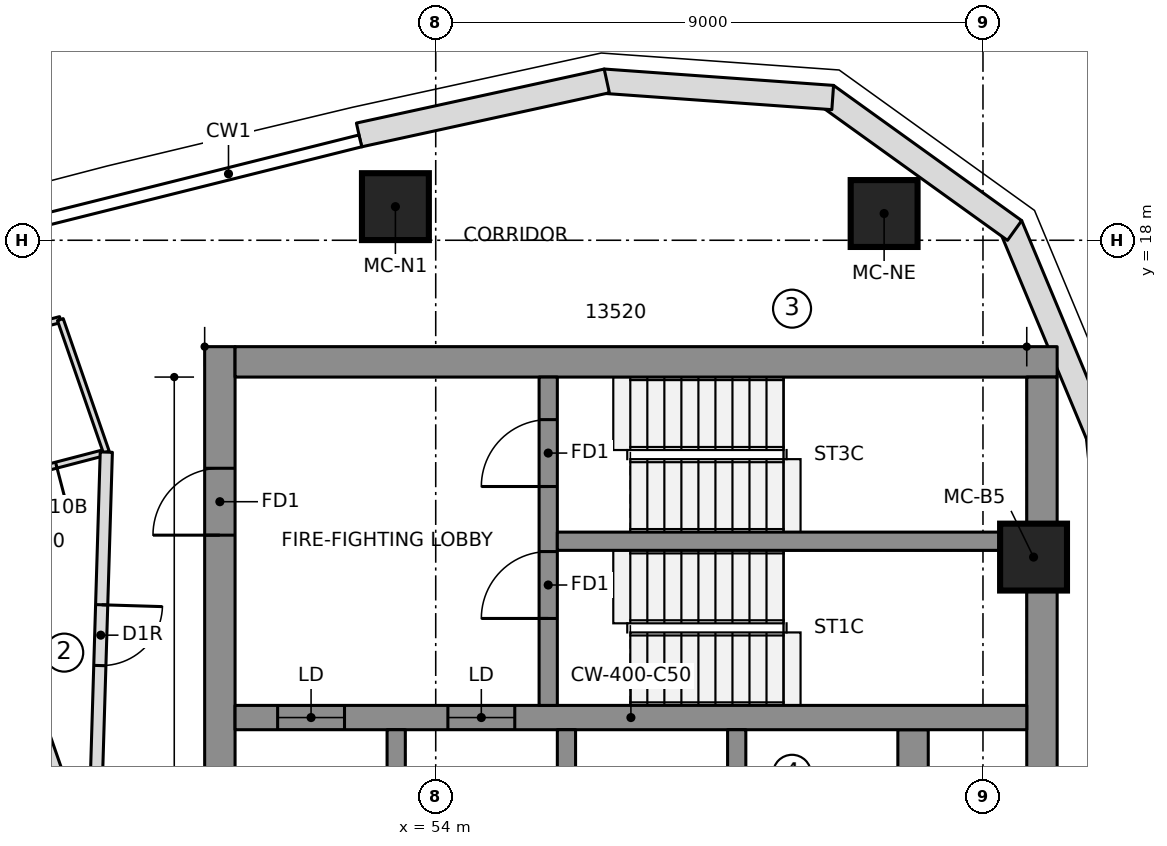
"""IFC4 building model, lengths in metres.
Left out: names, types, materials, properties, quantities, classifications, styles, units other than length and angle.
Written with IfcOpenShell. Run it as: python <this file> out.ifc"""

import sys

from ifc_helpers import new_model, si_unit, direction, frame, frame_2d, origin, origin_2d, place, context, subcontext, project, spatial, polyline, rectangle, outline, extrude, element, fill, save


model = new_model("IFC4")
c1 = context("Model", 3, precision=1e-05, world=origin(), true_north=direction((0.0, 1.0)))
c2 = subcontext(c1, "Body", "Model", "MODEL_VIEW")
j1 = project(units=[si_unit("LENGTHUNIT", "METRE"), si_unit("PLANEANGLEUNIT", "RADIAN")], contexts=[c1])
p1 = place(None, origin())
s1 = spatial("IfcSite", under=j1, at=p1, CompositionType="ELEMENT")
p2 = place(p1, origin())
s2 = spatial("IfcBuilding", under=s1, at=p2, CompositionType="ELEMENT")
p3 = place(p2, frame((0.0, 0.0, 285.65)))
s3 = spatial("IfcBuildingStorey", under=s2, at=p3, CompositionType="ELEMENT", Elevation=285.65)
p4 = place(p3, frame((50.45, 6.65, 0.0), z_axis=(0.0, 0.0, 1.0), x_axis=(0.0, 1.0, 0.0)))
e1 = element("IfcWall", 1, at=p4, inside=s3, PredefinedType="SHEAR", context=c2, shape_type="SweptSolid", body=[
    extrude(rectangle(XDim=9.6, YDim=0.5, at=frame_2d((4.8, 0.0))), origin(), (0.0, 0.0, 1.0), 3.55),
])
p5 = place(p4, frame((6.5, 0.0, 0.0)))
e2 = element("IfcOpeningElement", 2, at=p5, cuts=e1, PredefinedType="OPENING", context=c2, shape_type="SweptSolid", body=[
    extrude(rectangle(XDim=1.1, YDim=2.1, at=frame_2d((0.55, 1.05))), frame((0.0, 0.26, 0.0), z_axis=(0.0, -1.0, 0.0), x_axis=(1.0, 0.0, 0.0)), (0.0, 0.0, 1.0), 0.52),
])
p6 = place(p3, frame((50.7, 16.0, 0.0), z_axis=(0.0, 0.0, 1.0), x_axis=(1.0, 0.0, 0.0)))
e3 = element("IfcWall", 3, at=p6, inside=s3, PredefinedType="SHEAR", context=c2, shape_type="SweptSolid", body=[
    extrude(rectangle(XDim=13.52, YDim=0.5, at=frame_2d((6.76, 0.0))), origin(), (0.0, 0.0, 1.0), 3.55),
])
p7 = place(p3, frame((63.97, 6.903, 0.0), z_axis=(0.0, 0.0, 1.0), x_axis=(0.0, 1.0, 0.0)))
e4 = element("IfcWall", 4, at=p7, inside=s3, PredefinedType="SHEAR", context=c2, shape_type="SweptSolid", body=[
    extrude(rectangle(XDim=8.847, YDim=0.5, at=frame_2d((4.423, 0.0))), origin(), (0.0, 0.0, 1.0), 3.55),
])
p8 = place(p3, frame((61.85, -9.95, 0.0), z_axis=(0.0, 0.0, 1.0), x_axis=(0.0, 1.0, 0.0)))
e5 = element("IfcWall", 5, at=p8, inside=s3, PredefinedType="SHEAR", context=c2, shape_type="SweptSolid", body=[
    extrude(rectangle(XDim=19.9, YDim=0.5, at=frame_2d((9.95, 0.0))), origin(), (0.0, 0.0, 1.0), 3.55),
])
p9 = place(p3, frame((50.7, 10.15, 0.0), z_axis=(0.0, 0.0, 1.0), x_axis=(1.0, 0.0, 0.0)))
e6 = element("IfcWall", 6, at=p9, inside=s3, PredefinedType="SHEAR", context=c2, shape_type="SweptSolid", body=[
    extrude(rectangle(XDim=13.02, YDim=0.4, at=frame_2d((6.51, 0.0))), origin(), (0.0, 0.0, 1.0), 3.55),
])
p10 = place(p9, frame((0.7, 0.0, 0.0)))
e7 = element("IfcOpeningElement", 7, at=p10, cuts=e6, PredefinedType="OPENING", context=c2, shape_type="SweptSolid", body=[
    extrude(rectangle(XDim=1.1, YDim=2.1, at=frame_2d((0.55, 1.05))), frame((0.0, 0.21, 0.0), z_axis=(0.0, -1.0, 0.0), x_axis=(1.0, 0.0, 0.0)), (0.0, 0.0, 1.0), 0.42),
])
p11 = place(p9, frame((3.5, 0.0, 0.0)))
e8 = element("IfcOpeningElement", 8, at=p11, cuts=e6, PredefinedType="OPENING", context=c2, shape_type="SweptSolid", body=[
    extrude(rectangle(XDim=1.1, YDim=2.1, at=frame_2d((0.55, 1.05))), frame((0.0, 0.21, 0.0), z_axis=(0.0, -1.0, 0.0), x_axis=(1.0, 0.0, 0.0)), (0.0, 0.0, 1.0), 0.42),
])
for number, where, z_axis, x_axis in (
    (9, (53.35, 6.95, 0.0), (0.0, 0.0, 1.0), (0.0, 1.0, 0.0)),
    (10, (56.15, 6.95, 0.0), (0.0, 0.0, 1.0), (0.0, 1.0, 0.0)),
    (11, (58.95, 6.95, 0.0), (0.0, 0.0, 1.0), (0.0, 1.0, 0.0)),
):
    element("IfcWall", number, at=place(p3, frame(where, z_axis=z_axis, x_axis=x_axis)), inside=s3, PredefinedType="SHEAR", context=c2, shape_type="SweptSolid", body=[
        extrude(rectangle(XDim=3.0, YDim=0.3, at=frame_2d((1.5, 0.0))), origin(), (0.0, 0.0, 1.0), 3.55),
    ])
p12 = place(p3, frame((55.85, 10.35, 0.0), z_axis=(0.0, 0.0, 1.0), x_axis=(0.0, 1.0, 0.0)))
e12 = element("IfcWall", 12, at=p12, inside=s3, PredefinedType="SHEAR", context=c2, shape_type="SweptSolid", body=[
    extrude(rectangle(XDim=5.4, YDim=0.3, at=frame_2d((2.7, 0.0))), origin(), (0.0, 0.0, 1.0), 3.55),
])
p13 = place(p12, frame((1.43, 0.0, 0.0)))
e13 = element("IfcOpeningElement", 13, at=p13, cuts=e12, PredefinedType="OPENING", context=c2, shape_type="SweptSolid", body=[
    extrude(rectangle(XDim=1.1, YDim=2.1, at=frame_2d((0.55, 1.05))), frame((0.0, 0.16, 0.0), z_axis=(0.0, -1.0, 0.0), x_axis=(1.0, 0.0, 0.0)), (0.0, 0.0, 1.0), 0.32),
])
p14 = place(p12, frame((3.6, 0.0, 0.0)))
e14 = element("IfcOpeningElement", 14, at=p14, cuts=e12, PredefinedType="OPENING", context=c2, shape_type="SweptSolid", body=[
    extrude(rectangle(XDim=1.1, YDim=2.1, at=frame_2d((0.55, 1.05))), frame((0.0, 0.16, 0.0), z_axis=(0.0, -1.0, 0.0), x_axis=(1.0, 0.0, 0.0)), (0.0, 0.0, 1.0), 0.32),
])
p15 = place(p3, frame((56.0, 13.05, 0.0), z_axis=(0.0, 0.0, 1.0), x_axis=(1.0, 0.0, 0.0)))
e15 = element("IfcWall", 15, at=p15, inside=s3, PredefinedType="SHEAR", context=c2, shape_type="SweptSolid", body=[
    extrude(rectangle(XDim=7.72, YDim=0.3, at=frame_2d((3.86, 0.0))), origin(), (0.0, 0.0, 1.0), 3.55),
])
for number, where, z_axis, x_axis in (
    (16, (63.832, 12.789, 0.0), (0.0, 0.0, 1.0), (1.0, 0.0, 0.0)),
    (17, (61.374, 18.44, 0.0), (0.0, 0.0, 1.0), (1.0, 0.0, 0.0)),
    (18, (53.337, 18.553, 0.0), (0.0, 0.0, 1.0), (1.0, 0.0, 0.0)),
):
    element("IfcColumn", number, at=place(p3, frame(where, z_axis=z_axis, x_axis=x_axis)), inside=s3, PredefinedType="COLUMN", context=c2, shape_type="SweptSolid", body=[
        extrude(rectangle(XDim=1.1, YDim=1.1, at=origin_2d()), origin(), (0.0, 0.0, 1.0), 3.55),
    ])
p16 = place(p3, frame((65.331, 10.571, 0.0), z_axis=(0.0, 0.0, 1.0), x_axis=(-0.102249826987, 0.994758751096, 0.0)))
e19 = element("IfcWall", 19, at=p16, inside=s3, PredefinedType="NOTDEFINED", context=c2, shape_type="SweptSolid", body=[
    extrude(outline(polyline([(-0.003, -0.2), (4.263, -0.2), (4.204, 0.2), (0.003, 0.2), (-0.003, -0.2)])), origin(), (0.0, 0.0, 1.0), 3.25),
])
p17 = place(p3, frame((64.898, 14.782, 0.0), z_axis=(0.0, 0.0, 1.0), x_axis=(-0.385285857918, 0.922797273343, 0.0)))
e20 = element("IfcWall", 20, at=p17, inside=s3, PredefinedType="NOTDEFINED", context=c2, shape_type="SweptSolid", body=[
    extrude(outline(polyline([(-0.03, -0.2), (3.753, -0.2), (3.64, 0.2), (0.03, 0.2), (-0.03, -0.2)])), origin(), (0.0, 0.0, 1.0), 3.25),
])
p18 = place(p3, frame((63.474, 18.194, 0.0), z_axis=(0.0, 0.0, 1.0), x_axis=(-0.811962548682, 0.583709533533, 0.0)))
e21 = element("IfcWall", 21, at=p18, inside=s3, PredefinedType="NOTDEFINED", context=c2, shape_type="SweptSolid", body=[
    extrude(outline(polyline([(-0.057, -0.2), (3.753, -0.2), (3.64, 0.2), (0.057, 0.2), (-0.057, -0.2)])), origin(), (0.0, 0.0, 1.0), 3.25),
])
p19 = place(p3, frame((60.472, 20.352, 0.0), z_axis=(0.0, 0.0, 1.0), x_axis=(-0.99746272096, 0.071190731806, 0.0)))
e22 = element("IfcWall", 22, at=p19, inside=s3, PredefinedType="NOTDEFINED", context=c2, shape_type="SweptSolid", body=[
    extrude(outline(polyline([(-0.057, -0.2), (3.726, -0.2), (3.668, 0.2), (0.057, 0.2), (-0.057, -0.2)])), origin(), (0.0, 0.0, 1.0), 3.25),
])
p20 = place(p3, frame((56.785, 20.615, 0.0), z_axis=(0.0, 0.0, 1.0), x_axis=(-0.977020225348, -0.213146614471, 0.0)))
e23 = element("IfcWall", 23, at=p20, inside=s3, PredefinedType="NOTDEFINED", context=c2, shape_type="SweptSolid", body=[
    extrude(outline(polyline([(-0.029, -0.2), (4.142, -0.2), (4.142, 0.2), (0.029, 0.2), (-0.029, -0.2)])), origin(), (0.0, 0.0, 1.0), 3.25),
])
p21 = place(p3, frame((48.023, 8.5, 0.0), z_axis=(0.0, 0.0, 1.0), x_axis=(-0.327705598625, 0.944779890043, 0.0)))
e24 = element("IfcWall", 24, at=p21, inside=s3, PredefinedType="PARTITIONING", context=c2, shape_type="SweptSolid", body=[
    extrude(rectangle(XDim=9.61, YDim=0.2, at=frame_2d((4.805, 0.0))), origin(), (0.0, 0.0, 1.0), 3.25),
])
p22 = place(p3, frame((48.583, 14.516, 0.0), z_axis=(0.0, 0.0, 1.0), x_axis=(-0.967665843663, -0.252235633897, 0.0)))
e25 = element("IfcWall", 25, at=p22, inside=s3, PredefinedType="PARTITIONING", context=c2, shape_type="SweptSolid", body=[
    extrude(rectangle(XDim=2.508, YDim=0.1, at=frame_2d((1.254, 0.0))), origin(), (0.0, 0.0, 1.0), 3.25),
])
p23 = place(p22, frame((0.85, 0.0, 0.0)))
e26 = element("IfcOpeningElement", 26, at=p23, cuts=e25, PredefinedType="OPENING", context=c2, shape_type="SweptSolid", body=[
    extrude(rectangle(XDim=0.8, YDim=2.1, at=frame_2d((0.4, 1.05))), frame((0.0, 0.06, 0.0), z_axis=(0.0, -1.0, 0.0), x_axis=(1.0, 0.0, 0.0)), (0.0, 0.0, 1.0), 0.12),
])
p24 = place(p3, frame((45.955, 16.208, 0.0), z_axis=(0.0, 0.0, 1.0), x_axis=(0.967650770907, 0.25229345129, 0.0)))
e27 = element("IfcWall", 27, at=p24, inside=s3, PredefinedType="PARTITIONING", context=c2, shape_type="SweptSolid", body=[
    extrude(rectangle(XDim=1.934, YDim=0.1, at=frame_2d((0.967, 0.0))), origin(), (0.0, 0.0, 1.0), 3.25),
])
p25 = place(p3, frame((47.826, 16.696, 0.0), z_axis=(0.0, 0.0, 1.0), x_axis=(0.327695604762, -0.944783356447, 0.0)))
e28 = element("IfcWall", 28, at=p25, inside=s3, PredefinedType="PARTITIONING", context=c2, shape_type="SweptSolid", body=[
    extrude(rectangle(XDim=2.307, YDim=0.1, at=frame_2d((1.154, 0.0))), origin(), (0.0, 0.0, 1.0), 3.25),
])
p26 = place(p3, frame((48.583, 14.516, 0.0), z_axis=(0.0, 0.0, 1.0), x_axis=(-0.030318578026, -0.999540286245, 0.0)))
e29 = element("IfcWall", 29, at=p26, inside=s3, PredefinedType="PARTITIONING", context=c2, shape_type="SweptSolid", body=[
    extrude(rectangle(XDim=6.023, YDim=0.2, at=frame_2d((3.012, 0.0))), origin(), (0.0, 0.0, 1.0), 3.25),
])
p27 = place(p26, frame((2.512, 0.0, 0.0)))
e30 = element("IfcOpeningElement", 30, at=p27, cuts=e29, PredefinedType="OPENING", context=c2, shape_type="SweptSolid", body=[
    extrude(rectangle(XDim=1.0, YDim=2.1, at=frame_2d((0.5, 1.05))), frame((0.0, 0.11, 0.0), z_axis=(0.0, -1.0, 0.0), x_axis=(1.0, 0.0, 0.0)), (0.0, 0.0, 1.0), 0.22),
])
p28 = place(p23, origin())
e31 = element("IfcDoor", 31, at=p28, inside=s3, OperationType="SINGLE_SWING_LEFT", PredefinedType="DOOR", context=c2, shape_type="SweptSolid", body=[
    extrude(rectangle(XDim=0.8, YDim=2.1, at=frame_2d((0.4, 1.05))), frame((0.0, 0.025, 0.0), z_axis=(0.0, -1.0, 0.0), x_axis=(1.0, 0.0, 0.0)), (0.0, 0.0, 1.0), 0.05),
])
fill(e26, e31)
p29 = place(p27, origin())
e32 = element("IfcDoor", 32, at=p29, inside=s3, OperationType="SINGLE_SWING_RIGHT", PredefinedType="DOOR", context=c2, shape_type="SweptSolid", body=[
    extrude(rectangle(XDim=1.0, YDim=2.1, at=frame_2d((0.5, 1.05))), frame((0.0, 0.025, 0.0), z_axis=(0.0, -1.0, 0.0), x_axis=(1.0, 0.0, 0.0)), (0.0, 0.0, 1.0), 0.05),
])
fill(e30, e32)
p30 = place(p10, origin())
e33 = element("IfcDoor", 33, at=p30, inside=s3, OperationType="DOUBLE_DOOR_SLIDING", PredefinedType="DOOR", context=c2, shape_type="SweptSolid", body=[
    extrude(rectangle(XDim=1.1, YDim=2.1, at=frame_2d((0.55, 1.05))), frame((0.0, 0.025, 0.0), z_axis=(0.0, -1.0, 0.0), x_axis=(1.0, 0.0, 0.0)), (0.0, 0.0, 1.0), 0.05),
])
fill(e7, e33)
p31 = place(p11, origin())
e34 = element("IfcDoor", 34, at=p31, inside=s3, OperationType="DOUBLE_DOOR_SLIDING", PredefinedType="DOOR", context=c2, shape_type="SweptSolid", body=[
    extrude(rectangle(XDim=1.1, YDim=2.1, at=frame_2d((0.55, 1.05))), frame((0.0, 0.025, 0.0), z_axis=(0.0, -1.0, 0.0), x_axis=(1.0, 0.0, 0.0)), (0.0, 0.0, 1.0), 0.05),
])
fill(e8, e34)
p32 = place(p13, origin())
e35 = element("IfcDoor", 35, at=p32, inside=s3, OperationType="SINGLE_SWING_RIGHT", PredefinedType="DOOR", context=c2, shape_type="SweptSolid", body=[
    extrude(rectangle(XDim=1.1, YDim=2.1, at=frame_2d((0.55, 1.05))), frame((0.0, 0.025, 0.0), z_axis=(0.0, -1.0, 0.0), x_axis=(1.0, 0.0, 0.0)), (0.0, 0.0, 1.0), 0.05),
])
fill(e13, e35)
p33 = place(p14, origin())
e36 = element("IfcDoor", 36, at=p33, inside=s3, OperationType="SINGLE_SWING_RIGHT", PredefinedType="DOOR", context=c2, shape_type="SweptSolid", body=[
    extrude(rectangle(XDim=1.1, YDim=2.1, at=frame_2d((0.55, 1.05))), frame((0.0, 0.025, 0.0), z_axis=(0.0, -1.0, 0.0), x_axis=(1.0, 0.0, 0.0)), (0.0, 0.0, 1.0), 0.05),
])
fill(e14, e36)
p34 = place(p5, origin())
e37 = element("IfcDoor", 37, at=p34, inside=s3, OperationType="SINGLE_SWING_RIGHT", PredefinedType="DOOR", context=c2, shape_type="SweptSolid", body=[
    extrude(rectangle(XDim=1.1, YDim=2.1, at=frame_2d((0.55, 1.05))), frame((0.0, 0.025, 0.0), z_axis=(0.0, -1.0, 0.0), x_axis=(1.0, 0.0, 0.0)), (0.0, 0.0, 1.0), 0.05),
])
fill(e2, e37)
save(model, sys.argv[1])
